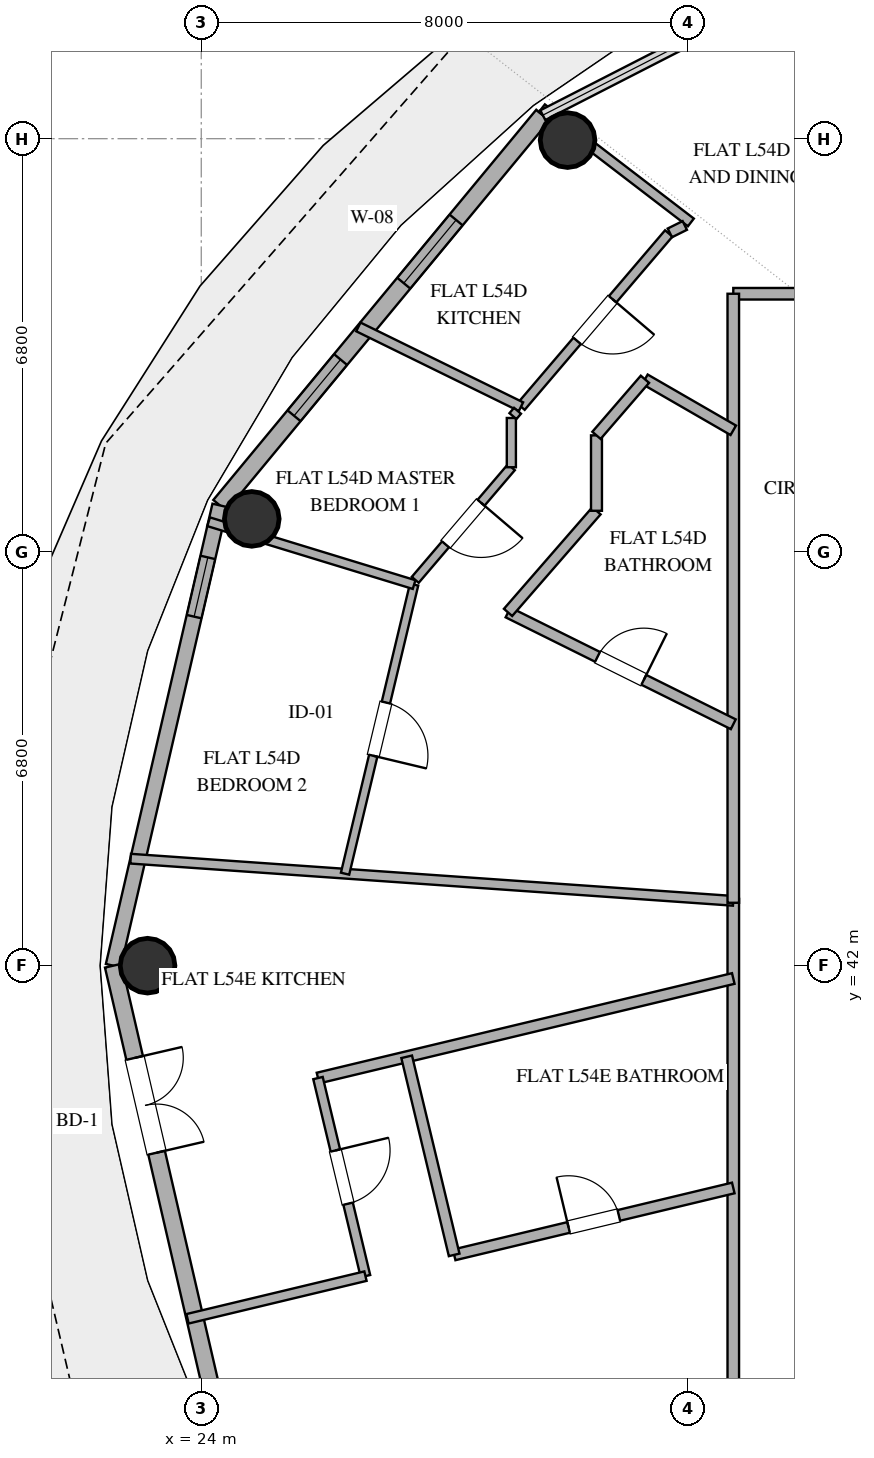
"""IFC4 building model, lengths in metres.
Left out: names, types, materials, properties, quantities, classifications, styles, units other than length and angle.
Written with IfcOpenShell. Run it as: python <this file> out.ifc"""

import sys

from ifc_helpers import new_model, si_unit, direction, frame, frame_2d, origin, origin_2d, place, context, subcontext, project, spatial, rectangle, hollow_circle, extrude, element, fill, save


model = new_model("IFC4")
c1 = context("Model", 3, precision=1e-05, world=origin(), true_north=direction((0.0, 1.0)))
c2 = subcontext(c1, "Body", "Model", "MODEL_VIEW")
j1 = project(units=[si_unit("LENGTHUNIT", "METRE"), si_unit("PLANEANGLEUNIT", "RADIAN")], contexts=[c1])
p1 = place(None, origin())
s1 = spatial("IfcSite", under=j1, at=p1, CompositionType="ELEMENT")
p2 = place(p1, origin())
s2 = spatial("IfcBuilding", under=s1, at=p2, CompositionType="ELEMENT")
p3 = place(p2, frame((0.0, 0.0, 213.6)))
s3 = spatial("IfcBuildingStorey", under=s2, at=p3, CompositionType="ELEMENT", Elevation=213.6)
for number, where, z_axis, x_axis in (
    (1, (30.025, 55.576, 0.0), (0.0, 0.0, 1.0), (1.0, 0.0, 0.0)),
    (2, (24.831, 49.347, 0.0), (0.0, 0.0, 1.0), (1.0, 0.0, 0.0)),
    (3, (23.117, 42.0, 0.0), (0.0, 0.0, 1.0), (1.0, 0.0, 0.0)),
):
    element("IfcColumn", number, at=place(p3, frame(where, z_axis=z_axis, x_axis=x_axis)), inside=s3, PredefinedType="COLUMN", context=c2, shape_type="SweptSolid", body=[
        extrude(hollow_circle(Radius=0.45, WallThickness=0.025, at=origin_2d()), origin(), (0.0, 0.0, 1.0), 3.36),
    ])
p4 = place(p3, frame((29.617, 55.987, 0.0), z_axis=(0.0, 0.0, 1.0), x_axis=(-0.63761509934, -0.770355103243, 0.0)))
e4 = element("IfcWall", 4, at=p4, inside=s3, PredefinedType="SOLIDWALL", context=c2, shape_type="SweptSolid", body=[
    extrude(rectangle(XDim=8.33, YDim=0.28, at=frame_2d((4.165, 0.0))), origin(), (0.0, 0.0, 1.0), 3.36),
])
p5 = place(p4, frame((2.237, 0.0, 0.85)))
e5 = element("IfcOpeningElement", 5, at=p5, cuts=e4, PredefinedType="OPENING", context=c2, shape_type="SweptSolid", body=[
    extrude(rectangle(XDim=1.35, YDim=1.8, at=frame_2d((0.675, 0.9))), frame((0.0, 0.15, 0.0), z_axis=(0.0, -1.0, 0.0), x_axis=(1.0, 0.0, 0.0)), (0.0, 0.0, 1.0), 0.3),
])
p6 = place(p4, frame((5.217, 0.0, 0.85)))
e6 = element("IfcOpeningElement", 6, at=p6, cuts=e4, PredefinedType="OPENING", context=c2, shape_type="SweptSolid", body=[
    extrude(rectangle(XDim=1.2, YDim=1.8, at=frame_2d((0.6, 0.9))), frame((0.0, 0.15, 0.0), z_axis=(0.0, -1.0, 0.0), x_axis=(1.0, 0.0, 0.0)), (0.0, 0.0, 1.0), 0.3),
])
p7 = place(p3, frame((24.306, 49.57, 0.0), z_axis=(0.0, 0.0, 1.0), x_axis=(-0.225635078214, -0.974211892495, 0.0)))
e7 = element("IfcWall", 7, at=p7, inside=s3, PredefinedType="SOLIDWALL", context=c2, shape_type="SweptSolid", body=[
    extrude(rectangle(XDim=7.77, YDim=0.25, at=frame_2d((3.885, 0.0))), origin(), (0.0, 0.0, 1.0), 3.36),
])
p8 = place(p7, frame((0.878, 0.0, 1.42)))
e8 = element("IfcOpeningElement", 8, at=p8, cuts=e7, PredefinedType="OPENING", context=c2, shape_type="SweptSolid", body=[
    extrude(rectangle(XDim=1.0, YDim=1.05, at=frame_2d((0.5, 0.525))), frame((0.0, 0.135, 0.0), z_axis=(0.0, -1.0, 0.0), x_axis=(1.0, 0.0, 0.0)), (0.0, 0.0, 1.0), 0.27),
])
p9 = place(p3, frame((22.553, 42.0, 0.0), z_axis=(0.0, 0.0, 1.0), x_axis=(0.225635078214, -0.974211892495, 0.0)))
e9 = element("IfcWall", 9, at=p9, inside=s3, PredefinedType="SOLIDWALL", context=c2, shape_type="SweptSolid", body=[
    extrude(rectangle(XDim=7.77, YDim=0.28, at=frame_2d((3.885, 0.0))), origin(), (0.0, 0.0, 1.0), 3.36),
])
p10 = place(p9, frame((1.557, 0.0, 0.0)))
e10 = element("IfcOpeningElement", 10, at=p10, cuts=e9, PredefinedType="OPENING", context=c2, shape_type="SweptSolid", body=[
    extrude(rectangle(XDim=1.6, YDim=2.25, at=frame_2d((0.8, 1.125))), frame((0.0, 0.15, 0.0), z_axis=(0.0, -1.0, 0.0), x_axis=(1.0, 0.0, 0.0)), (0.0, 0.0, 1.0), 0.3),
])
p11 = place(p3, frame((32.75, 53.05, 0.0), z_axis=(0.0, 0.0, 1.0), x_axis=(1.0, 0.0, 0.0)))
e11 = element("IfcWall", 11, at=p11, inside=s3, PredefinedType="PARTITIONING", context=c2, shape_type="SweptSolid", body=[
    extrude(rectangle(XDim=13.247, YDim=0.19, at=frame_2d((6.623, 0.0))), origin(), (0.0, 0.0, 1.0), 2.72),
])
p12 = place(p11, frame((3.417, 0.0, 0.0)))
e12 = element("IfcOpeningElement", 12, at=p12, cuts=e11, PredefinedType="OPENING", context=c2, shape_type="SweptSolid", body=[
    extrude(rectangle(XDim=1.0, YDim=2.2, at=frame_2d((0.5, 1.1))), frame((0.0, 0.105, 0.0), z_axis=(0.0, -1.0, 0.0), x_axis=(1.0, 0.0, 0.0)), (0.0, 0.0, 1.0), 0.21),
])
p13 = place(p11, frame((10.002, 0.0, 0.0)))
e13 = element("IfcOpeningElement", 13, at=p13, cuts=e11, PredefinedType="OPENING", context=c2, shape_type="SweptSolid", body=[
    extrude(rectangle(XDim=1.0, YDim=2.2, at=frame_2d((0.5, 1.1))), frame((0.0, 0.105, 0.0), z_axis=(0.0, -1.0, 0.0), x_axis=(1.0, 0.0, 0.0)), (0.0, 0.0, 1.0), 0.21),
])
p14 = place(p3, frame((32.75, 30.95, 0.0), z_axis=(0.0, 0.0, 1.0), x_axis=(0.0, 1.0, 0.0)))
e14 = element("IfcWall", 14, at=p14, inside=s3, PredefinedType="PARTITIONING", context=c2, shape_type="SweptSolid", body=[
    extrude(rectangle(XDim=12.148, YDim=0.19, at=frame_2d((6.074, 0.0))), origin(), (0.0, 0.0, 1.0), 2.72),
])
p15 = place(p14, frame((3.214, 0.0, 0.0)))
e15 = element("IfcOpeningElement", 15, at=p15, cuts=e14, PredefinedType="OPENING", context=c2, shape_type="SweptSolid", body=[
    extrude(rectangle(XDim=1.0, YDim=2.2, at=frame_2d((0.5, 1.1))), frame((0.0, 0.105, 0.0), z_axis=(0.0, -1.0, 0.0), x_axis=(1.0, 0.0, 0.0)), (0.0, 0.0, 1.0), 0.21),
])
p16 = place(p3, frame((22.839, 43.76, 0.0), z_axis=(0.0, 0.0, 1.0), x_axis=(0.997563620801, -0.069762615023, 0.0)))
e16 = element("IfcWall", 16, at=p16, inside=s3, PredefinedType="PLUMBINGWALL", context=c2, shape_type="SweptSolid", body=[
    extrude(rectangle(XDim=9.935, YDim=0.16, at=frame_2d((4.968, 0.0))), origin(), (0.0, 0.0, 1.0), 2.72),
])
p17 = place(p3, frame((32.75, 41.789, 0.0), z_axis=(0.0, 0.0, 1.0), x_axis=(-0.97245226222, -0.233102118618, 0.0)))
e17 = element("IfcWall", 17, at=p17, inside=s3, PredefinedType="PLUMBINGWALL", context=c2, shape_type="SweptSolid", body=[
    extrude(rectangle(XDim=7.024, YDim=0.18, at=frame_2d((3.512, 0.0))), origin(), (0.0, 0.0, 1.0), 2.72),
])
p18 = place(p3, frame((32.75, 43.034, 0.0), z_axis=(0.0, 0.0, 1.0), x_axis=(0.0, 1.0, 0.0)))
e18 = element("IfcWall", 18, at=p18, inside=s3, PredefinedType="PARTITIONING", context=c2, shape_type="SweptSolid", body=[
    extrude(rectangle(XDim=10.016, YDim=0.19, at=frame_2d((5.008, 0.0))), origin(), (0.0, 0.0, 1.0), 2.72),
])
p19 = place(p3, frame((27.5, 48.267, 0.0), z_axis=(0.0, 0.0, 1.0), x_axis=(-0.232297954947, -0.972644673109, 0.0)))
e19 = element("IfcWall", 19, at=p19, inside=s3, PredefinedType="PARTITIONING", context=c2, shape_type="SweptSolid", body=[
    extrude(rectangle(XDim=4.888, YDim=0.14, at=frame_2d((2.444, 0.0))), origin(), (0.0, 0.0, 1.0), 2.72),
])
p20 = place(p19, frame((1.994, 0.0, 0.0)))
e20 = element("IfcOpeningElement", 20, at=p20, cuts=e19, PredefinedType="OPENING", context=c2, shape_type="SweptSolid", body=[
    extrude(rectangle(XDim=0.9, YDim=2.1, at=frame_2d((0.45, 1.05))), frame((0.0, 0.08, 0.0), z_axis=(0.0, -1.0, 0.0), x_axis=(1.0, 0.0, 0.0)), (0.0, 0.0, 1.0), 0.16),
])
p21 = place(p3, frame((28.159, 37.244, 0.0), z_axis=(0.0, 0.0, 1.0), x_axis=(0.972442669344, 0.233142134415, 0.0)))
e21 = element("IfcWall", 21, at=p21, inside=s3, PredefinedType="PLUMBINGWALL", context=c2, shape_type="SweptSolid", body=[
    extrude(rectangle(XDim=4.721, YDim=0.18, at=frame_2d((2.36, 0.0))), origin(), (0.0, 0.0, 1.0), 2.72),
])
p22 = place(p21, frame((1.935, 0.0, 0.0)))
e22 = element("IfcOpeningElement", 22, at=p22, cuts=e21, PredefinedType="OPENING", context=c2, shape_type="SweptSolid", body=[
    extrude(rectangle(XDim=0.85, YDim=2.1, at=frame_2d((0.425, 1.05))), frame((0.0, 0.1, 0.0), z_axis=(0.0, -1.0, 0.0), x_axis=(1.0, 0.0, 0.0)), (0.0, 0.0, 1.0), 0.2),
])
p23 = place(p3, frame((29.046, 47.809, 0.0), z_axis=(0.0, 0.0, 1.0), x_axis=(0.895675225239, -0.444708770876, 0.0)))
e23 = element("IfcWall", 23, at=p23, inside=s3, PredefinedType="PLUMBINGWALL", context=c2, shape_type="SweptSolid", body=[
    extrude(rectangle(XDim=4.135, YDim=0.18, at=frame_2d((2.068, 0.0))), origin(), (0.0, 0.0, 1.0), 2.72),
])
p24 = place(p23, frame((1.643, 0.0, 0.0)))
e24 = element("IfcOpeningElement", 24, at=p24, cuts=e23, PredefinedType="OPENING", context=c2, shape_type="SweptSolid", body=[
    extrude(rectangle(XDim=0.85, YDim=2.1, at=frame_2d((0.425, 1.05))), frame((0.0, 0.1, 0.0), z_axis=(0.0, -1.0, 0.0), x_axis=(1.0, 0.0, 0.0)), (0.0, 0.0, 1.0), 0.2),
])
p25 = place(p3, frame((31.689, 54.042, 0.0), z_axis=(0.0, 0.0, 1.0), x_axis=(-0.648996547252, -0.760791352248, 0.0)))
e25 = element("IfcWall", 25, at=p25, inside=s3, PredefinedType="PLUMBINGWALL", context=c2, shape_type="SweptSolid", body=[
    extrude(rectangle(XDim=3.745, YDim=0.16, at=frame_2d((1.873, 0.0))), origin(), (0.0, 0.0, 1.0), 2.72),
])
p26 = place(p25, frame((1.423, 0.0, 0.0)))
e26 = element("IfcOpeningElement", 26, at=p26, cuts=e25, PredefinedType="OPENING", context=c2, shape_type="SweptSolid", body=[
    extrude(rectangle(XDim=0.9, YDim=2.1, at=frame_2d((0.45, 1.05))), frame((0.0, 0.09, 0.0), z_axis=(0.0, -1.0, 0.0), x_axis=(1.0, 0.0, 0.0)), (0.0, 0.0, 1.0), 0.18),
])
p27 = place(p3, frame((27.5, 48.267, 0.0), z_axis=(0.0, 0.0, 1.0), x_axis=(-0.956303289689, 0.292376500647, 0.0)))
e27 = element("IfcWall", 27, at=p27, inside=s3, PredefinedType="PARTITIONING", context=c2, shape_type="SweptSolid", body=[
    extrude(rectangle(XDim=3.534, YDim=0.15, at=frame_2d((1.767, 0.0))), origin(), (0.0, 0.0, 1.0), 2.72),
])
p28 = place(p3, frame((27.378, 40.501, 0.0), z_axis=(0.0, 0.0, 1.0), x_axis=(0.233144161333, -0.97244218339, 0.0)))
e28 = element("IfcWall", 28, at=p28, inside=s3, PredefinedType="PLUMBINGWALL", context=c2, shape_type="SweptSolid", body=[
    extrude(rectangle(XDim=3.35, YDim=0.18, at=frame_2d((1.675, 0.0))), origin(), (0.0, 0.0, 1.0), 2.72),
])
p29 = place(p3, frame((25.92, 40.152, 0.0), z_axis=(0.0, 0.0, 1.0), x_axis=(0.233075240748, -0.972458704599, 0.0)))
e29 = element("IfcWall", 29, at=p29, inside=s3, PredefinedType="PLUMBINGWALL", context=c2, shape_type="SweptSolid", body=[
    extrude(rectangle(XDim=3.35, YDim=0.16, at=frame_2d((1.675, 0.0))), origin(), (0.0, 0.0, 1.0), 2.72),
])
p30 = place(p29, frame((1.225, 0.0, 0.0)))
e30 = element("IfcOpeningElement", 30, at=p30, cuts=e29, PredefinedType="OPENING", context=c2, shape_type="SweptSolid", body=[
    extrude(rectangle(XDim=0.9, YDim=2.1, at=frame_2d((0.45, 1.05))), frame((0.0, 0.09, 0.0), z_axis=(0.0, -1.0, 0.0), x_axis=(1.0, 0.0, 0.0)), (0.0, 0.0, 1.0), 0.18),
])
p31 = place(p3, frame((29.603, 56.101, 0.0), z_axis=(0.0, 0.0, 1.0), x_axis=(0.793701828105, -0.608307001491, 0.0)))
e31 = element("IfcWall", 31, at=p31, inside=s3, PredefinedType="PLUMBINGWALL", context=c2, shape_type="SweptSolid", body=[
    extrude(rectangle(XDim=3.087, YDim=0.16, at=frame_2d((1.543, 0.0))), origin(), (0.0, 0.0, 1.0), 2.72),
])
p32 = place(p3, frame((26.701, 36.894, 0.0), z_axis=(0.0, 0.0, 1.0), x_axis=(-0.972463854185, -0.233053754107, 0.0)))
e32 = element("IfcWall", 32, at=p32, inside=s3, PredefinedType="PLUMBINGWALL", context=c2, shape_type="SweptSolid", body=[
    extrude(rectangle(XDim=3.009, YDim=0.16, at=frame_2d((1.504, 0.0))), origin(), (0.0, 0.0, 1.0), 2.72),
])
p33 = place(p3, frame((29.258, 51.193, 0.0), z_axis=(0.0, 0.0, 1.0), x_axis=(-0.897810810902, 0.440381366348, 0.0)))
e33 = element("IfcWall", 33, at=p33, inside=s3, PredefinedType="PLUMBINGWALL", context=c2, shape_type="SweptSolid", body=[
    extrude(rectangle(XDim=2.979, YDim=0.16, at=frame_2d((1.489, 0.0))), origin(), (0.0, 0.0, 1.0), 2.72),
])
p34 = place(p3, frame((29.1, 50.197, 0.0), z_axis=(0.0, 0.0, 1.0), x_axis=(-0.649270866973, -0.760557257082, 0.0)))
e34 = element("IfcWall", 34, at=p34, inside=s3, PredefinedType="PARTITIONING", context=c2, shape_type="SweptSolid", body=[
    extrude(rectangle(XDim=2.435, YDim=0.15, at=frame_2d((1.218, 0.0))), origin(), (0.0, 0.0, 1.0), 2.72),
])
p35 = place(p34, frame((0.768, 0.0, 0.0)))
e35 = element("IfcOpeningElement", 35, at=p35, cuts=e34, PredefinedType="OPENING", context=c2, shape_type="SweptSolid", body=[
    extrude(rectangle(XDim=0.9, YDim=2.1, at=frame_2d((0.45, 1.05))), frame((0.0, 0.085, 0.0), z_axis=(0.0, -1.0, 0.0), x_axis=(1.0, 0.0, 0.0)), (0.0, 0.0, 1.0), 0.17),
])
p36 = place(p3, frame((30.5, 49.481, 0.0), z_axis=(0.0, 0.0, 1.0), x_axis=(-0.656364223854, -0.754444169998, 0.0)))
e36 = element("IfcWall", 36, at=p36, inside=s3, PredefinedType="PLUMBINGWALL", context=c2, shape_type="SweptSolid", body=[
    extrude(rectangle(XDim=2.215, YDim=0.18, at=frame_2d((1.108, 0.0))), origin(), (0.0, 0.0, 1.0), 2.72),
])
p37 = place(p3, frame((32.75, 50.805, 0.0), z_axis=(0.0, 0.0, 1.0), x_axis=(-0.866013522419, 0.500020578564, 0.0)))
e37 = element("IfcWall", 37, at=p37, inside=s3, PredefinedType="PLUMBINGWALL", context=c2, shape_type="SweptSolid", body=[
    extrude(rectangle(XDim=1.678, YDim=0.18, at=frame_2d((0.839, 0.0))), origin(), (0.0, 0.0, 1.0), 2.72),
])
p38 = place(p3, frame((30.5, 50.721, 0.0), z_axis=(0.0, 0.0, 1.0), x_axis=(0.0, -1.0, 0.0)))
e38 = element("IfcWall", 38, at=p38, inside=s3, PredefinedType="PLUMBINGWALL", context=c2, shape_type="SweptSolid", body=[
    extrude(rectangle(XDim=1.24, YDim=0.18, at=frame_2d((0.62, 0.0))), origin(), (0.0, 0.0, 1.0), 2.72),
])
p39 = place(p3, frame((31.297, 51.644, 0.0), z_axis=(0.0, 0.0, 1.0), x_axis=(-0.653870108477, -0.756606820773, 0.0)))
e39 = element("IfcWall", 39, at=p39, inside=s3, PredefinedType="PLUMBINGWALL", context=c2, shape_type="SweptSolid", body=[
    extrude(rectangle(XDim=1.219, YDim=0.18, at=frame_2d((0.609, 0.0))), origin(), (0.0, 0.0, 1.0), 2.72),
])
p40 = place(p3, frame((29.1, 51.007, 0.0), z_axis=(0.0, 0.0, 1.0), x_axis=(0.0, -1.0, 0.0)))
e40 = element("IfcWall", 40, at=p40, inside=s3, PredefinedType="PARTITIONING", context=c2, shape_type="SweptSolid", body=[
    extrude(rectangle(XDim=0.81, YDim=0.15, at=frame_2d((0.405, 0.0))), origin(), (0.0, 0.0, 1.0), 2.72),
])
p41 = place(p3, frame((31.952, 54.173, 0.0), z_axis=(0.0, 0.0, 1.0), x_axis=(-0.895316278345, -0.445430984251, 0.0)))
e41 = element("IfcWall", 41, at=p41, inside=s3, PredefinedType="PLUMBINGWALL", context=c2, shape_type="SweptSolid", body=[
    extrude(rectangle(XDim=0.274, YDim=0.16, at=frame_2d((0.137, 0.0))), origin(), (0.0, 0.0, 1.0), 2.72),
])
p42 = place(p3, frame((29.201, 51.126, 0.0), z_axis=(0.0, 0.0, 1.0), x_axis=(-0.649232735888, -0.760589807092, 0.0)))
e42 = element("IfcWall", 42, at=p42, inside=s3, PredefinedType="PARTITIONING", context=c2, shape_type="SweptSolid", body=[
    extrude(rectangle(XDim=0.116, YDim=0.15, at=frame_2d((0.058, 0.0))), origin(), (0.0, 0.0, 1.0), 2.72),
])
p43 = place(p5, origin())
e43 = element("IfcWindow", 43, at=p43, inside=s3, PartitioningType="SINGLE_PANEL", PredefinedType="WINDOW", context=c2, shape_type="SweptSolid", body=[
    extrude(rectangle(XDim=1.35, YDim=1.8, at=frame_2d((0.675, 0.9))), frame((0.0, 0.03, 0.0), z_axis=(0.0, -1.0, 0.0), x_axis=(1.0, 0.0, 0.0)), (0.0, 0.0, 1.0), 0.06),
])
fill(e5, e43)
p44 = place(p6, origin())
e44 = element("IfcWindow", 44, at=p44, inside=s3, PartitioningType="SINGLE_PANEL", PredefinedType="WINDOW", context=c2, shape_type="SweptSolid", body=[
    extrude(rectangle(XDim=1.2, YDim=1.8, at=frame_2d((0.6, 0.9))), frame((0.0, 0.03, 0.0), z_axis=(0.0, -1.0, 0.0), x_axis=(1.0, 0.0, 0.0)), (0.0, 0.0, 1.0), 0.06),
])
fill(e6, e44)
p45 = place(p10, origin())
e45 = element("IfcDoor", 45, at=p45, inside=s3, OperationType="DOUBLE_DOOR_SINGLE_SWING", PredefinedType="DOOR", context=c2, shape_type="SweptSolid", body=[
    extrude(rectangle(XDim=1.6, YDim=2.25, at=frame_2d((0.8, 1.125))), frame((0.0, 0.025, 0.0), z_axis=(0.0, -1.0, 0.0), x_axis=(1.0, 0.0, 0.0)), (0.0, 0.0, 1.0), 0.05),
])
fill(e10, e45)
p46 = place(p8, origin())
e46 = element("IfcWindow", 46, at=p46, inside=s3, PartitioningType="SINGLE_PANEL", PredefinedType="WINDOW", context=c2, shape_type="SweptSolid", body=[
    extrude(rectangle(XDim=1.0, YDim=1.05, at=frame_2d((0.5, 0.525))), frame((0.0, 0.03, 0.0), z_axis=(0.0, -1.0, 0.0), x_axis=(1.0, 0.0, 0.0)), (0.0, 0.0, 1.0), 0.06),
])
fill(e8, e46)
p47 = place(p20, origin())
e47 = element("IfcDoor", 47, at=p47, inside=s3, OperationType="SINGLE_SWING_RIGHT", PredefinedType="DOOR", context=c2, shape_type="SweptSolid", body=[
    extrude(rectangle(XDim=0.9, YDim=2.1, at=frame_2d((0.45, 1.05))), frame((0.0, 0.025, 0.0), z_axis=(0.0, -1.0, 0.0), x_axis=(1.0, 0.0, 0.0)), (0.0, 0.0, 1.0), 0.05),
])
fill(e20, e47)
p48 = place(p22, origin())
e48 = element("IfcDoor", 48, at=p48, inside=s3, OperationType="SINGLE_SWING_LEFT", PredefinedType="DOOR", context=c2, shape_type="SweptSolid", body=[
    extrude(rectangle(XDim=0.85, YDim=2.1, at=frame_2d((0.425, 1.05))), frame((0.0, 0.025, 0.0), z_axis=(0.0, -1.0, 0.0), x_axis=(1.0, 0.0, 0.0)), (0.0, 0.0, 1.0), 0.05),
])
fill(e22, e48)
p49 = place(p24, origin())
e49 = element("IfcDoor", 49, at=p49, inside=s3, OperationType="SINGLE_SWING_RIGHT", PredefinedType="DOOR", context=c2, shape_type="SweptSolid", body=[
    extrude(rectangle(XDim=0.85, YDim=2.1, at=frame_2d((0.425, 1.05))), frame((0.0, 0.025, 0.0), z_axis=(0.0, -1.0, 0.0), x_axis=(1.0, 0.0, 0.0)), (0.0, 0.0, 1.0), 0.05),
])
fill(e24, e49)
p50 = place(p26, origin())
e50 = element("IfcDoor", 50, at=p50, inside=s3, OperationType="SINGLE_SWING_LEFT", PredefinedType="DOOR", context=c2, shape_type="SweptSolid", body=[
    extrude(rectangle(XDim=0.9, YDim=2.1, at=frame_2d((0.45, 1.05))), frame((0.0, 0.025, 0.0), z_axis=(0.0, -1.0, 0.0), x_axis=(1.0, 0.0, 0.0)), (0.0, 0.0, 1.0), 0.05),
])
fill(e26, e50)
p51 = place(p30, origin())
e51 = element("IfcDoor", 51, at=p51, inside=s3, OperationType="SINGLE_SWING_LEFT", PredefinedType="DOOR", context=c2, shape_type="SweptSolid", body=[
    extrude(rectangle(XDim=0.9, YDim=2.1, at=frame_2d((0.45, 1.05))), frame((0.0, 0.025, 0.0), z_axis=(0.0, -1.0, 0.0), x_axis=(1.0, 0.0, 0.0)), (0.0, 0.0, 1.0), 0.05),
])
fill(e30, e51)
p52 = place(p35, origin())
e52 = element("IfcDoor", 52, at=p52, inside=s3, OperationType="SINGLE_SWING_LEFT", PredefinedType="DOOR", context=c2, shape_type="SweptSolid", body=[
    extrude(rectangle(XDim=0.9, YDim=2.1, at=frame_2d((0.45, 1.05))), frame((0.0, 0.025, 0.0), z_axis=(0.0, -1.0, 0.0), x_axis=(1.0, 0.0, 0.0)), (0.0, 0.0, 1.0), 0.05),
])
fill(e35, e52)
save(model, sys.argv[1])
